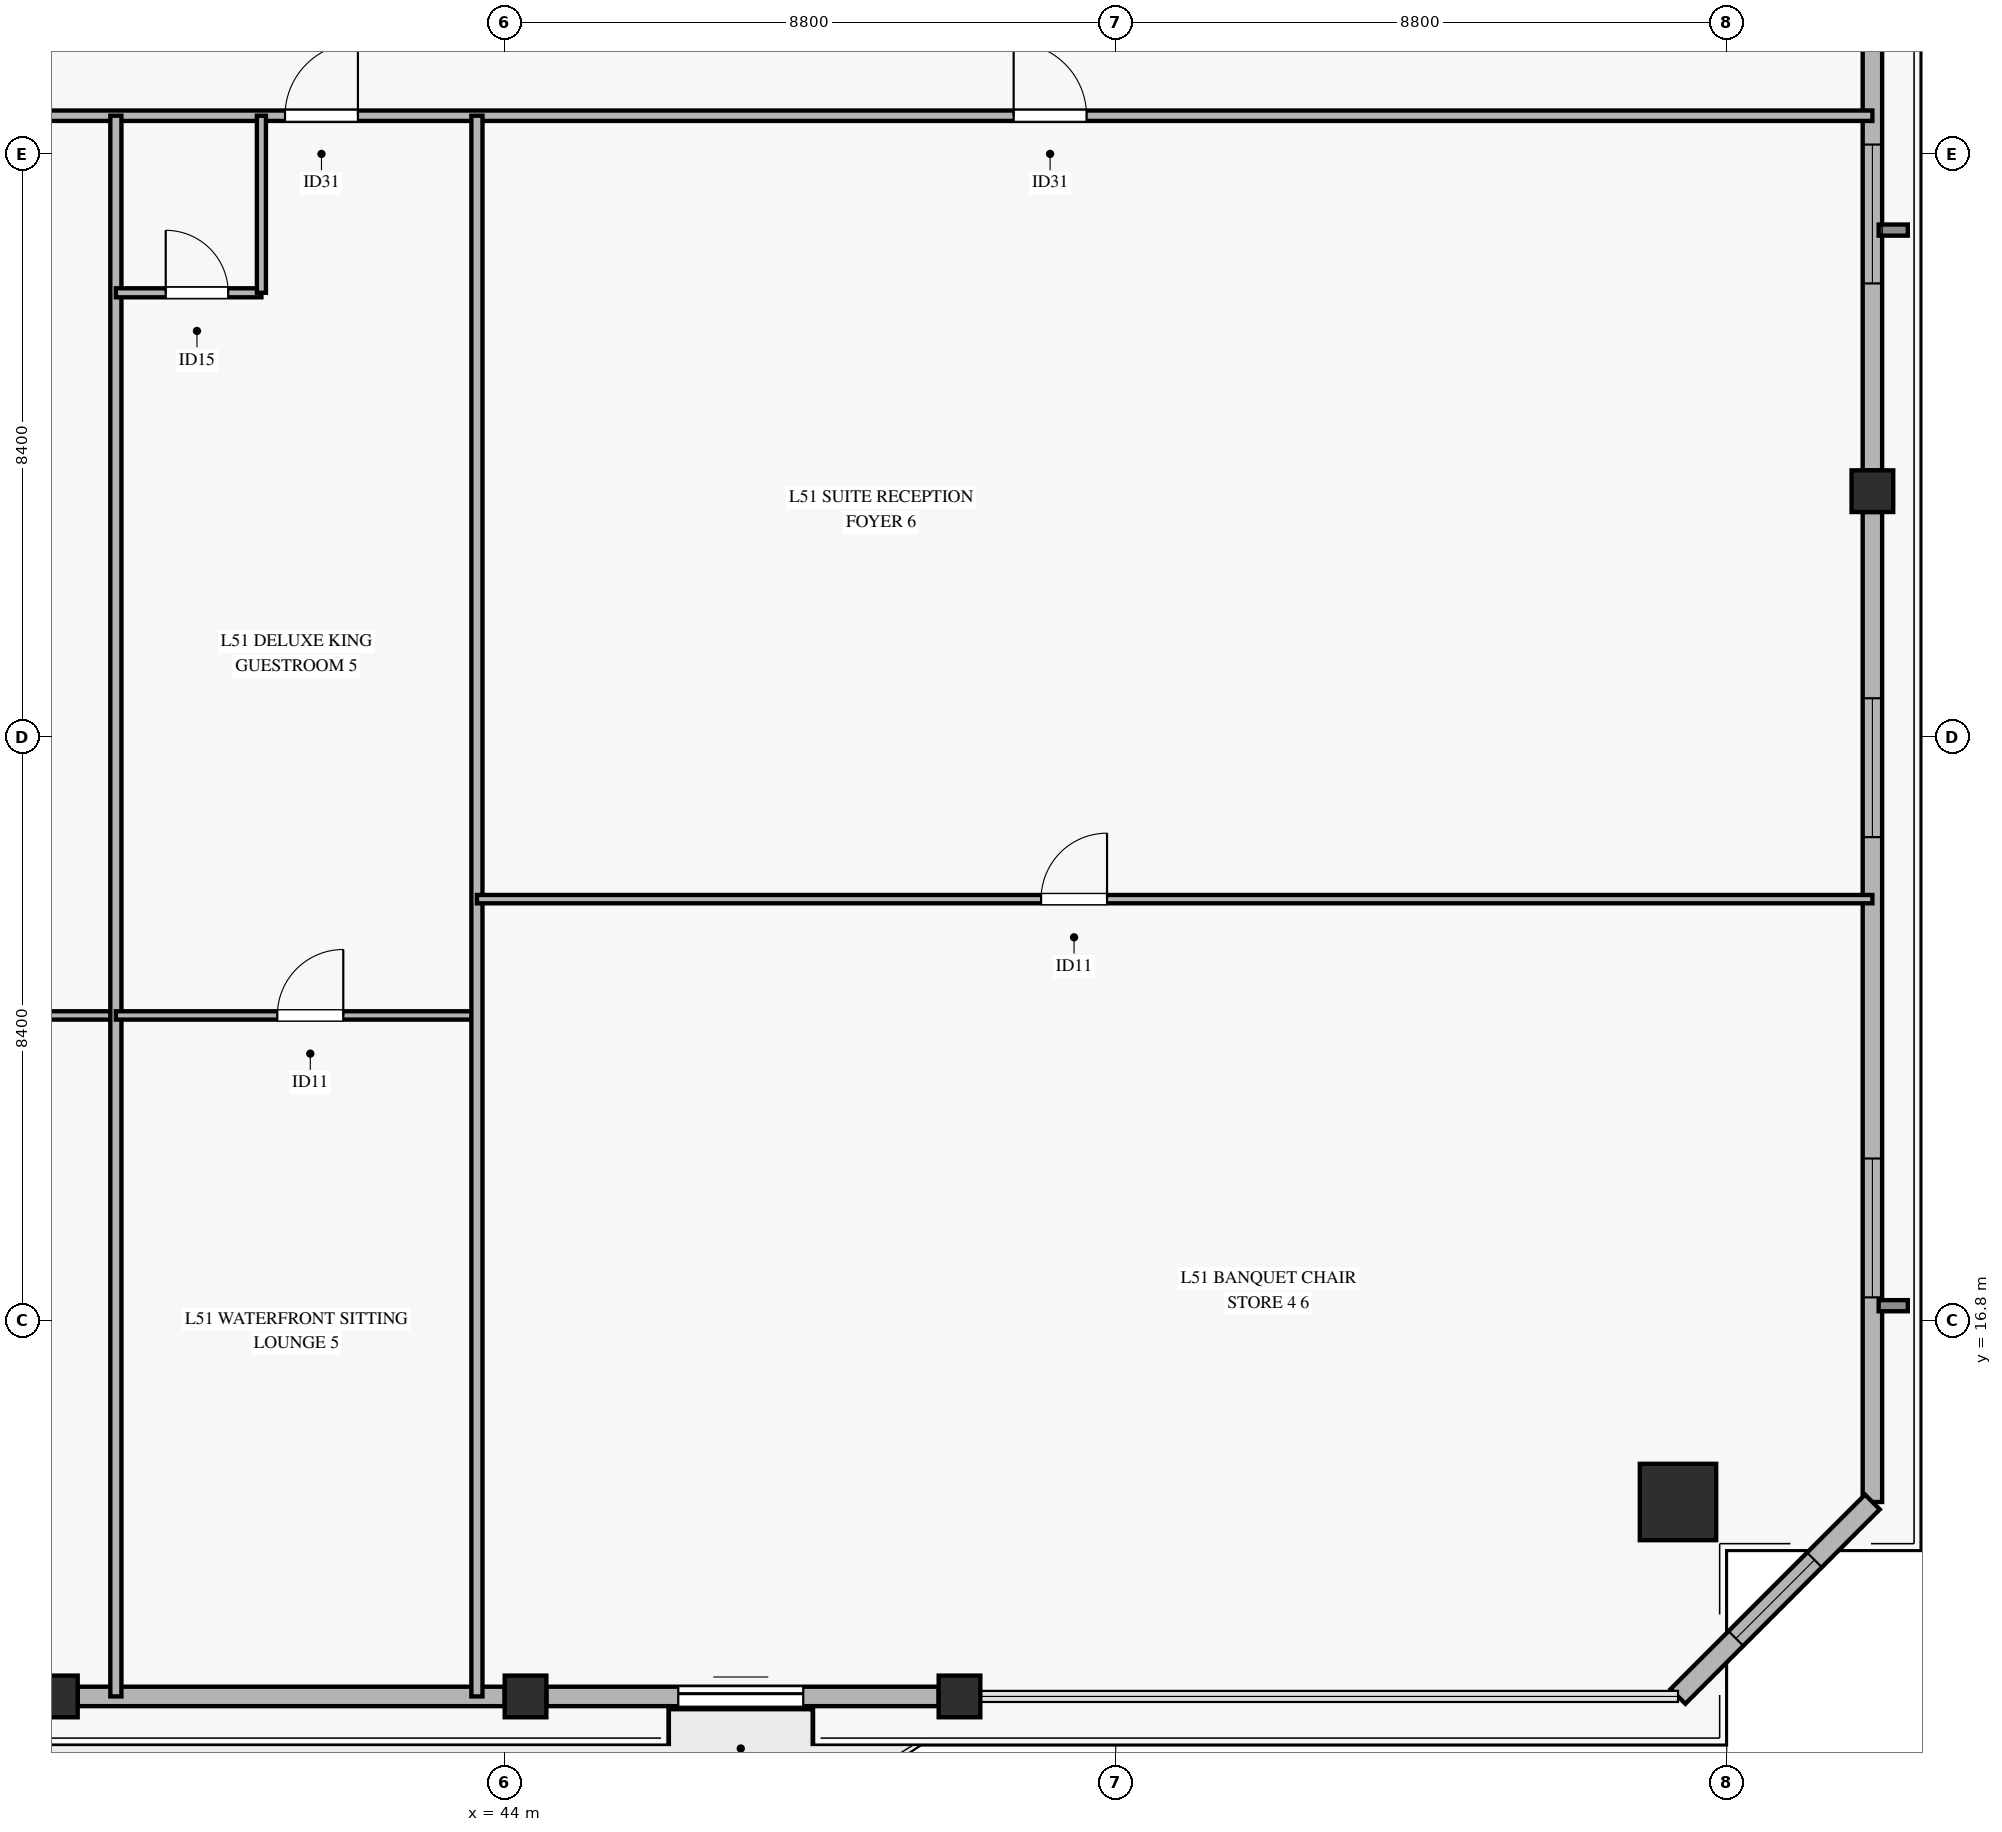
"""IFC4 building model, lengths in metres.
Left out: names, types, materials, properties, quantities, classifications, styles, units other than length and angle.
Written with IfcOpenShell. Run it as: python <this file> out.ifc"""

import sys

from ifc_helpers import new_model, si_unit, direction, frame, frame_2d, origin, origin_2d, place, context, subcontext, project, spatial, rectangle, hollow_rectangle, extrude, source, transform, mapped, element, fill, save


model = new_model("IFC4")
c1 = context("Model", 3, precision=1e-05, world=origin(), true_north=direction((0.0, 1.0)))
c2 = subcontext(c1, "Body", "Model", "MODEL_VIEW")
j1 = project(units=[si_unit("LENGTHUNIT", "METRE"), si_unit("PLANEANGLEUNIT", "RADIAN")], contexts=[c1])
p1 = place(None, origin())
s1 = spatial("IfcSite", under=j1, at=p1, CompositionType="ELEMENT")
p2 = place(p1, origin())
s2 = spatial("IfcBuilding", under=s1, at=p2, CompositionType="ELEMENT")
p3 = place(p2, frame((0.0, 0.0, 202.7)))
s3 = spatial("IfcBuildingStorey", under=s2, at=p3, CompositionType="ELEMENT", Elevation=202.7)
m1 = source(origin(), c2, "Body", "SweptSolid", [
    extrude(hollow_rectangle(XDim=1.1, YDim=1.1, WallThickness=0.05, at=origin_2d()), origin(), (0.0, 0.0, 1.0), 3.27),
])
p4 = place(p3, frame((60.898, 14.186, 0.0), z_axis=(0.0, 0.0, 1.0), x_axis=(1.0, 0.0, 0.0)))
e1 = element("IfcColumn", 1, at=p4, inside=s3, PredefinedType="COLUMN", context=c2, shape_type="MappedRepresentation", body=[
    mapped(m1, transform((0.0, 0.0, 0.0), x_axis=(1.0, 0.0, 0.0), y_axis=(0.0, 1.0, 0.0), z_axis=(0.0, 0.0, 1.0), scale=1.0)),
])
m2 = source(origin(), c2, "Body", "SweptSolid", [
    extrude(hollow_rectangle(XDim=0.6, YDim=0.6, WallThickness=0.028, at=origin_2d()), origin(), (0.0, 0.0, 1.0), 3.27),
])
for number, where, z_axis, x_axis in (
    (2, (37.55, 11.386, 0.0), (0.0, 0.0, 1.0), (1.0, 0.0, 0.0)),
    (3, (44.3, 11.386, 0.0), (0.0, 0.0, 1.0), (1.0, 0.0, 0.0)),
    (4, (50.55, 11.386, 0.0), (0.0, 0.0, 1.0), (1.0, 0.0, 0.0)),
    (5, (63.698, 28.743, 0.0), (0.0, 0.0, 1.0), (1.0, 0.0, 0.0)),
):
    element("IfcColumn", number, at=place(p3, frame(where, z_axis=z_axis, x_axis=x_axis)), inside=s3, PredefinedType="COLUMN", context=c2, shape_type="MappedRepresentation", body=[
        mapped(m2, transform((0.0, 0.0, 0.0), x_axis=(1.0, 0.0, 0.0), y_axis=(0.0, 1.0, 0.0), z_axis=(0.0, 0.0, 1.0), scale=1.0)),
    ])
p5 = place(p3, frame((37.85, 11.386, 0.0), z_axis=(0.0, 0.0, 1.0), x_axis=(1.0, 0.0, 0.0)))
e6 = element("IfcWall", 6, at=p5, inside=s3, PredefinedType="SOLIDWALL", context=c2, shape_type="SweptSolid", body=[
    extrude(rectangle(XDim=6.15, YDim=0.28, at=frame_2d((3.075, 0.0))), origin(), (0.0, 0.0, 1.0), 2.75),
])
p6 = place(p3, frame((44.6, 11.386, 0.0), z_axis=(0.0, 0.0, 1.0), x_axis=(1.0, 0.0, 0.0)))
e7 = element("IfcWall", 7, at=p6, inside=s3, PredefinedType="SOLIDWALL", context=c2, shape_type="SweptSolid", body=[
    extrude(rectangle(XDim=5.65, YDim=0.28, at=frame_2d((2.825, 0.0))), origin(), (0.0, 0.0, 1.0), 2.75),
])
p7 = place(p6, frame((1.9, 0.0, 0.0)))
e8 = element("IfcOpeningElement", 8, at=p7, cuts=e7, PredefinedType="OPENING", context=c2, shape_type="SweptSolid", body=[
    extrude(rectangle(XDim=1.8, YDim=2.25, at=frame_2d((0.9, 1.125))), frame((0.0, 0.15, 0.0), z_axis=(0.0, -1.0, 0.0), x_axis=(1.0, 0.0, 0.0)), (0.0, 0.0, 1.0), 0.3),
])
p8 = place(p3, frame((63.698, 14.186, 0.0), z_axis=(0.0, 0.0, 1.0), x_axis=(0.0, 1.0, 0.0)))
e9 = element("IfcWall", 9, at=p8, inside=s3, PredefinedType="SOLIDWALL", context=c2, shape_type="SweptSolid", body=[
    extrude(rectangle(XDim=14.257, YDim=0.28, at=frame_2d((7.128, 0.0))), origin(), (0.0, 0.0, 1.0), 2.75),
])
p9 = place(p8, frame((2.947, 0.0, 0.45)))
e10 = element("IfcOpeningElement", 10, at=p9, cuts=e9, PredefinedType="OPENING", context=c2, shape_type="SweptSolid", body=[
    extrude(rectangle(XDim=2.0, YDim=2.0, at=frame_2d((1.0, 1.0))), frame((0.0, 0.15, 0.0), z_axis=(0.0, -1.0, 0.0), x_axis=(1.0, 0.0, 0.0)), (0.0, 0.0, 1.0), 0.3),
])
p10 = place(p8, frame((9.575, 0.0, 0.45)))
e11 = element("IfcOpeningElement", 11, at=p10, cuts=e9, PredefinedType="OPENING", context=c2, shape_type="SweptSolid", body=[
    extrude(rectangle(XDim=2.0, YDim=2.0, at=frame_2d((1.0, 1.0))), frame((0.0, 0.15, 0.0), z_axis=(0.0, -1.0, 0.0), x_axis=(1.0, 0.0, 0.0)), (0.0, 0.0, 1.0), 0.3),
])
p11 = place(p3, frame((63.698, 29.043, 0.0), z_axis=(0.0, 0.0, 1.0), x_axis=(0.0, 1.0, 0.0)))
e12 = element("IfcWall", 12, at=p11, inside=s3, PredefinedType="SOLIDWALL", context=c2, shape_type="SweptSolid", body=[
    extrude(rectangle(XDim=14.257, YDim=0.28, at=frame_2d((7.128, 0.0))), origin(), (0.0, 0.0, 1.0), 2.75),
])
p12 = place(p11, frame((2.692, 0.0, 0.45)))
e13 = element("IfcOpeningElement", 13, at=p12, cuts=e12, PredefinedType="OPENING", context=c2, shape_type="SweptSolid", body=[
    extrude(rectangle(XDim=2.0, YDim=2.0, at=frame_2d((1.0, 1.0))), frame((0.0, 0.15, 0.0), z_axis=(0.0, -1.0, 0.0), x_axis=(1.0, 0.0, 0.0)), (0.0, 0.0, 1.0), 0.3),
])
p13 = place(p3, frame((60.898, 11.386, 0.0), z_axis=(0.0, 0.0, 1.0), x_axis=(0.707106781187, 0.707106781187, 0.0)))
e14 = element("IfcWall", 14, at=p13, inside=s3, PredefinedType="SOLIDWALL", context=c2, shape_type="SweptSolid", body=[
    extrude(rectangle(XDim=3.96, YDim=0.3, at=frame_2d((1.98, 0.0))), origin(), (0.0, 0.0, 1.0), 2.75),
])
p14 = place(p13, frame((1.18, 0.0, 0.45)))
e15 = element("IfcOpeningElement", 15, at=p14, cuts=e14, PredefinedType="OPENING", context=c2, shape_type="SweptSolid", body=[
    extrude(rectangle(XDim=1.6, YDim=2.0, at=frame_2d((0.8, 1.0))), frame((0.0, 0.16, 0.0), z_axis=(0.0, -1.0, 0.0), x_axis=(1.0, 0.0, 0.0)), (0.0, 0.0, 1.0), 0.32),
])
p15 = place(p3, frame((6.703, 34.15, 0.0), z_axis=(0.0, 0.0, 1.0), x_axis=(1.0, 0.0, 0.0)))
e16 = element("IfcWall", 16, at=p15, inside=s3, PredefinedType="PARTITIONING", context=c2, shape_type="SweptSolid", body=[
    extrude(rectangle(XDim=56.995, YDim=0.15, at=frame_2d((28.498, 0.0))), origin(), (0.0, 0.0, 1.0), 2.455),
])
p16 = place(p15, frame((6.03, 0.0, 0.0)))
e17 = element("IfcOpeningElement", 17, at=p16, cuts=e16, PredefinedType="OPENING", context=c2, shape_type="SweptSolid", body=[
    extrude(rectangle(XDim=1.05, YDim=2.15, at=frame_2d((0.525, 1.075))), frame((0.0, 0.085, 0.0), z_axis=(0.0, -1.0, 0.0), x_axis=(1.0, 0.0, 0.0)), (0.0, 0.0, 1.0), 0.17),
])
p17 = place(p15, frame((17.622, 0.0, 0.0)))
e18 = element("IfcOpeningElement", 18, at=p17, cuts=e16, PredefinedType="OPENING", context=c2, shape_type="SweptSolid", body=[
    extrude(rectangle(XDim=1.05, YDim=2.15, at=frame_2d((0.525, 1.075))), frame((0.0, 0.085, 0.0), z_axis=(0.0, -1.0, 0.0), x_axis=(1.0, 0.0, 0.0)), (0.0, 0.0, 1.0), 0.17),
])
p18 = place(p15, frame((23.442, 0.0, 0.0)))
e19 = element("IfcOpeningElement", 19, at=p18, cuts=e16, PredefinedType="OPENING", context=c2, shape_type="SweptSolid", body=[
    extrude(rectangle(XDim=1.05, YDim=2.15, at=frame_2d((0.525, 1.075))), frame((0.0, 0.085, 0.0), z_axis=(0.0, -1.0, 0.0), x_axis=(1.0, 0.0, 0.0)), (0.0, 0.0, 1.0), 0.17),
])
p19 = place(p15, frame((28.933, 0.0, 0.0)))
e20 = element("IfcOpeningElement", 20, at=p19, cuts=e16, PredefinedType="OPENING", context=c2, shape_type="SweptSolid", body=[
    extrude(rectangle(XDim=1.05, YDim=2.15, at=frame_2d((0.525, 1.075))), frame((0.0, 0.085, 0.0), z_axis=(0.0, -1.0, 0.0), x_axis=(1.0, 0.0, 0.0)), (0.0, 0.0, 1.0), 0.17),
])
p20 = place(p15, frame((34.133, 0.0, 0.0)))
e21 = element("IfcOpeningElement", 21, at=p20, cuts=e16, PredefinedType="OPENING", context=c2, shape_type="SweptSolid", body=[
    extrude(rectangle(XDim=1.05, YDim=2.15, at=frame_2d((0.525, 1.075))), frame((0.0, 0.085, 0.0), z_axis=(0.0, -1.0, 0.0), x_axis=(1.0, 0.0, 0.0)), (0.0, 0.0, 1.0), 0.17),
])
p21 = place(p15, frame((44.627, 0.0, 0.0)))
e22 = element("IfcOpeningElement", 22, at=p21, cuts=e16, PredefinedType="OPENING", context=c2, shape_type="SweptSolid", body=[
    extrude(rectangle(XDim=1.05, YDim=2.15, at=frame_2d((0.525, 1.075))), frame((0.0, 0.085, 0.0), z_axis=(0.0, -1.0, 0.0), x_axis=(1.0, 0.0, 0.0)), (0.0, 0.0, 1.0), 0.17),
])
p22 = place(p3, frame((33.2, 21.193, 0.0), z_axis=(0.0, 0.0, 1.0), x_axis=(1.0, 0.0, 0.0)))
e23 = element("IfcWall", 23, at=p22, inside=s3, PredefinedType="PARTITIONING", context=c2, shape_type="SweptSolid", body=[
    extrude(rectangle(XDim=5.2, YDim=0.12, at=frame_2d((2.6, 0.0))), origin(), (0.0, 0.0, 1.0), 2.455),
])
p23 = place(p22, frame((2.325, 0.0, 0.0)))
e24 = element("IfcOpeningElement", 24, at=p23, cuts=e23, PredefinedType="OPENING", context=c2, shape_type="SweptSolid", body=[
    extrude(rectangle(XDim=0.95, YDim=2.1, at=frame_2d((0.475, 1.05))), frame((0.0, 0.07, 0.0), z_axis=(0.0, -1.0, 0.0), x_axis=(1.0, 0.0, 0.0)), (0.0, 0.0, 1.0), 0.14),
])
p24 = place(p3, frame((38.4, 11.386, 0.0), z_axis=(0.0, 0.0, 1.0), x_axis=(0.0, 1.0, 0.0)))
e25 = element("IfcWall", 25, at=p24, inside=s3, PredefinedType="PARTITIONING", context=c2, shape_type="SweptSolid", body=[
    extrude(rectangle(XDim=22.764, YDim=0.16, at=frame_2d((11.382, 0.0))), origin(), (0.0, 0.0, 1.0), 2.755),
])
p25 = place(p3, frame((38.4, 31.6, 0.0), z_axis=(0.0, 0.0, 1.0), x_axis=(1.0, 0.0, 0.0)))
e26 = element("IfcWall", 26, at=p25, inside=s3, PredefinedType="PARTITIONING", context=c2, shape_type="SweptSolid", body=[
    extrude(rectangle(XDim=2.096, YDim=0.13, at=frame_2d((1.048, 0.0))), origin(), (0.0, 0.0, 1.0), 3.27),
])
p26 = place(p25, frame((0.718, 0.0, 0.0)))
e27 = element("IfcOpeningElement", 27, at=p26, cuts=e26, PredefinedType="OPENING", context=c2, shape_type="SweptSolid", body=[
    extrude(rectangle(XDim=0.9, YDim=2.1, at=frame_2d((0.45, 1.05))), frame((0.0, 0.075, 0.0), z_axis=(0.0, -1.0, 0.0), x_axis=(1.0, 0.0, 0.0)), (0.0, 0.0, 1.0), 0.15),
])
p27 = place(p3, frame((40.496, 31.6, 0.0), z_axis=(0.0, 0.0, 1.0), x_axis=(0.0, 1.0, 0.0)))
e28 = element("IfcWall", 28, at=p27, inside=s3, PredefinedType="PARTITIONING", context=c2, shape_type="SweptSolid", body=[
    extrude(rectangle(XDim=2.55, YDim=0.13, at=frame_2d((1.275, 0.0))), origin(), (0.0, 0.0, 1.0), 2.855),
])
p28 = place(p3, frame((38.4, 21.193, 0.0), z_axis=(0.0, 0.0, 1.0), x_axis=(1.0, 0.0, 0.0)))
e29 = element("IfcWall", 29, at=p28, inside=s3, PredefinedType="PARTITIONING", context=c2, shape_type="SweptSolid", body=[
    extrude(rectangle(XDim=5.2, YDim=0.12, at=frame_2d((2.6, 0.0))), origin(), (0.0, 0.0, 1.0), 3.27),
])
p29 = place(p28, frame((2.325, 0.0, 0.0)))
e30 = element("IfcOpeningElement", 30, at=p29, cuts=e29, PredefinedType="OPENING", context=c2, shape_type="SweptSolid", body=[
    extrude(rectangle(XDim=0.95, YDim=2.1, at=frame_2d((0.475, 1.05))), frame((0.0, 0.07, 0.0), z_axis=(0.0, -1.0, 0.0), x_axis=(1.0, 0.0, 0.0)), (0.0, 0.0, 1.0), 0.14),
])
p30 = place(p3, frame((43.6, 11.386, 0.0), z_axis=(0.0, 0.0, 1.0), x_axis=(0.0, 1.0, 0.0)))
e31 = element("IfcWall", 31, at=p30, inside=s3, PredefinedType="PARTITIONING", context=c2, shape_type="SweptSolid", body=[
    extrude(rectangle(XDim=22.764, YDim=0.16, at=frame_2d((11.382, 0.0))), origin(), (0.0, 0.0, 1.0), 2.755),
])
p31 = place(p3, frame((43.6, 22.868, 0.0), z_axis=(0.0, 0.0, 1.0), x_axis=(1.0, 0.0, 0.0)))
e32 = element("IfcWall", 32, at=p31, inside=s3, PredefinedType="PARTITIONING", context=c2, shape_type="SweptSolid", body=[
    extrude(rectangle(XDim=20.098, YDim=0.12, at=frame_2d((10.049, 0.0))), origin(), (0.0, 0.0, 1.0), 2.455),
])
p32 = place(p31, frame((8.125, 0.0, 0.0)))
e33 = element("IfcOpeningElement", 33, at=p32, cuts=e32, PredefinedType="OPENING", context=c2, shape_type="SweptSolid", body=[
    extrude(rectangle(XDim=0.95, YDim=2.1, at=frame_2d((0.475, 1.05))), frame((0.0, 0.07, 0.0), z_axis=(0.0, -1.0, 0.0), x_axis=(1.0, 0.0, 0.0)), (0.0, 0.0, 1.0), 0.14),
])
m3 = source(origin(), c2, "Body", "SweptSolid", [
    extrude(rectangle(XDim=1.8, YDim=2.25, at=frame_2d((0.9, 1.125))), frame((0.0, 0.025, 0.0), z_axis=(0.0, -1.0, 0.0), x_axis=(1.0, 0.0, 0.0)), (0.0, 0.0, 1.0), 0.05),
])
p33 = place(p7, origin())
e34 = element("IfcDoor", 34, at=p33, inside=s3, OperationType="SLIDING_TO_LEFT", PredefinedType="DOOR", context=c2, shape_type="MappedRepresentation", body=[
    mapped(m3, transform((0.0, 0.0, 0.0), x_axis=(1.0, 0.0, 0.0), y_axis=(0.0, 1.0, 0.0), z_axis=(0.0, 0.0, 1.0), scale=1.0)),
])
fill(e8, e34)
m4 = source(origin(), c2, "Body", "SweptSolid", [
    extrude(rectangle(XDim=2.0, YDim=2.0, at=frame_2d((1.0, 1.0))), frame((0.0, 0.03, 0.0), z_axis=(0.0, -1.0, 0.0), x_axis=(1.0, 0.0, 0.0)), (0.0, 0.0, 1.0), 0.06),
])
p34 = place(p9, origin())
e35 = element("IfcWindow", 35, at=p34, inside=s3, PartitioningType="SINGLE_PANEL", PredefinedType="WINDOW", context=c2, shape_type="MappedRepresentation", body=[
    mapped(m4, transform((0.0, 0.0, 0.0), x_axis=(1.0, 0.0, 0.0), y_axis=(0.0, 1.0, 0.0), z_axis=(0.0, 0.0, 1.0), scale=1.0)),
])
fill(e10, e35)
p35 = place(p10, origin())
e36 = element("IfcWindow", 36, at=p35, inside=s3, PartitioningType="SINGLE_PANEL", PredefinedType="WINDOW", context=c2, shape_type="MappedRepresentation", body=[
    mapped(m4, transform((0.0, 0.0, 0.0), x_axis=(1.0, 0.0, 0.0), y_axis=(0.0, 1.0, 0.0), z_axis=(0.0, 0.0, 1.0), scale=1.0)),
])
fill(e11, e36)
p36 = place(p12, origin())
e37 = element("IfcWindow", 37, at=p36, inside=s3, PartitioningType="SINGLE_PANEL", PredefinedType="WINDOW", context=c2, shape_type="MappedRepresentation", body=[
    mapped(m4, transform((0.0, 0.0, 0.0), x_axis=(1.0, 0.0, 0.0), y_axis=(0.0, 1.0, 0.0), z_axis=(0.0, 0.0, 1.0), scale=1.0)),
])
fill(e13, e37)
m5 = source(origin(), c2, "Body", "SweptSolid", [
    extrude(rectangle(XDim=1.6, YDim=2.0, at=frame_2d((0.8, 1.0))), frame((0.0, 0.03, 0.0), z_axis=(0.0, -1.0, 0.0), x_axis=(1.0, 0.0, 0.0)), (0.0, 0.0, 1.0), 0.06),
])
p37 = place(p14, origin())
e38 = element("IfcWindow", 38, at=p37, inside=s3, PartitioningType="SINGLE_PANEL", PredefinedType="WINDOW", context=c2, shape_type="MappedRepresentation", body=[
    mapped(m5, transform((0.0, 0.0, 0.0), x_axis=(1.0, 0.0, 0.0), y_axis=(0.0, 1.0, 0.0), z_axis=(0.0, 0.0, 1.0), scale=1.0)),
])
fill(e15, e38)
m6 = source(origin(), c2, "Body", "SweptSolid", [
    extrude(rectangle(XDim=1.05, YDim=2.15, at=frame_2d((0.525, 1.075))), frame((0.0, 0.025, 0.0), z_axis=(0.0, -1.0, 0.0), x_axis=(1.0, 0.0, 0.0)), (0.0, 0.0, 1.0), 0.05),
])
p38 = place(p20, origin())
e39 = element("IfcDoor", 39, at=p38, inside=s3, OperationType="SINGLE_SWING_RIGHT", PredefinedType="DOOR", context=c2, shape_type="MappedRepresentation", body=[
    mapped(m6, transform((0.0, 0.0, 0.0), x_axis=(1.0, 0.0, 0.0), y_axis=(0.0, 1.0, 0.0), z_axis=(0.0, 0.0, 1.0), scale=1.0)),
])
fill(e21, e39)
m7 = source(origin(), c2, "Body", "SweptSolid", [
    extrude(rectangle(XDim=0.9, YDim=2.1, at=frame_2d((0.45, 1.05))), frame((0.0, 0.025, 0.0), z_axis=(0.0, -1.0, 0.0), x_axis=(1.0, 0.0, 0.0)), (0.0, 0.0, 1.0), 0.05),
])
p39 = place(p26, origin())
e40 = element("IfcDoor", 40, at=p39, inside=s3, OperationType="SINGLE_SWING_LEFT", PredefinedType="DOOR", context=c2, shape_type="MappedRepresentation", body=[
    mapped(m7, transform((0.0, 0.0, 0.0), x_axis=(1.0, 0.0, 0.0), y_axis=(0.0, 1.0, 0.0), z_axis=(0.0, 0.0, 1.0), scale=1.0)),
])
fill(e27, e40)
m8 = source(origin(), c2, "Body", "SweptSolid", [
    extrude(rectangle(XDim=0.95, YDim=2.1, at=frame_2d((0.475, 1.05))), frame((0.0, 0.025, 0.0), z_axis=(0.0, -1.0, 0.0), x_axis=(1.0, 0.0, 0.0)), (0.0, 0.0, 1.0), 0.05),
])
p40 = place(p29, origin())
e41 = element("IfcDoor", 41, at=p40, inside=s3, OperationType="SINGLE_SWING_RIGHT", PredefinedType="DOOR", context=c2, shape_type="MappedRepresentation", body=[
    mapped(m8, transform((0.0, 0.0, 0.0), x_axis=(1.0, 0.0, 0.0), y_axis=(0.0, 1.0, 0.0), z_axis=(0.0, 0.0, 1.0), scale=1.0)),
])
fill(e30, e41)
p41 = place(p21, origin())
e42 = element("IfcDoor", 42, at=p41, inside=s3, OperationType="SINGLE_SWING_LEFT", PredefinedType="DOOR", context=c2, shape_type="MappedRepresentation", body=[
    mapped(m6, transform((0.0, 0.0, 0.0), x_axis=(1.0, 0.0, 0.0), y_axis=(0.0, 1.0, 0.0), z_axis=(0.0, 0.0, 1.0), scale=1.0)),
])
fill(e22, e42)
p42 = place(p32, origin())
e43 = element("IfcDoor", 43, at=p42, inside=s3, OperationType="SINGLE_SWING_RIGHT", PredefinedType="DOOR", context=c2, shape_type="MappedRepresentation", body=[
    mapped(m8, transform((0.0, 0.0, 0.0), x_axis=(1.0, 0.0, 0.0), y_axis=(0.0, 1.0, 0.0), z_axis=(0.0, 0.0, 1.0), scale=1.0)),
])
fill(e33, e43)
save(model, sys.argv[1])
